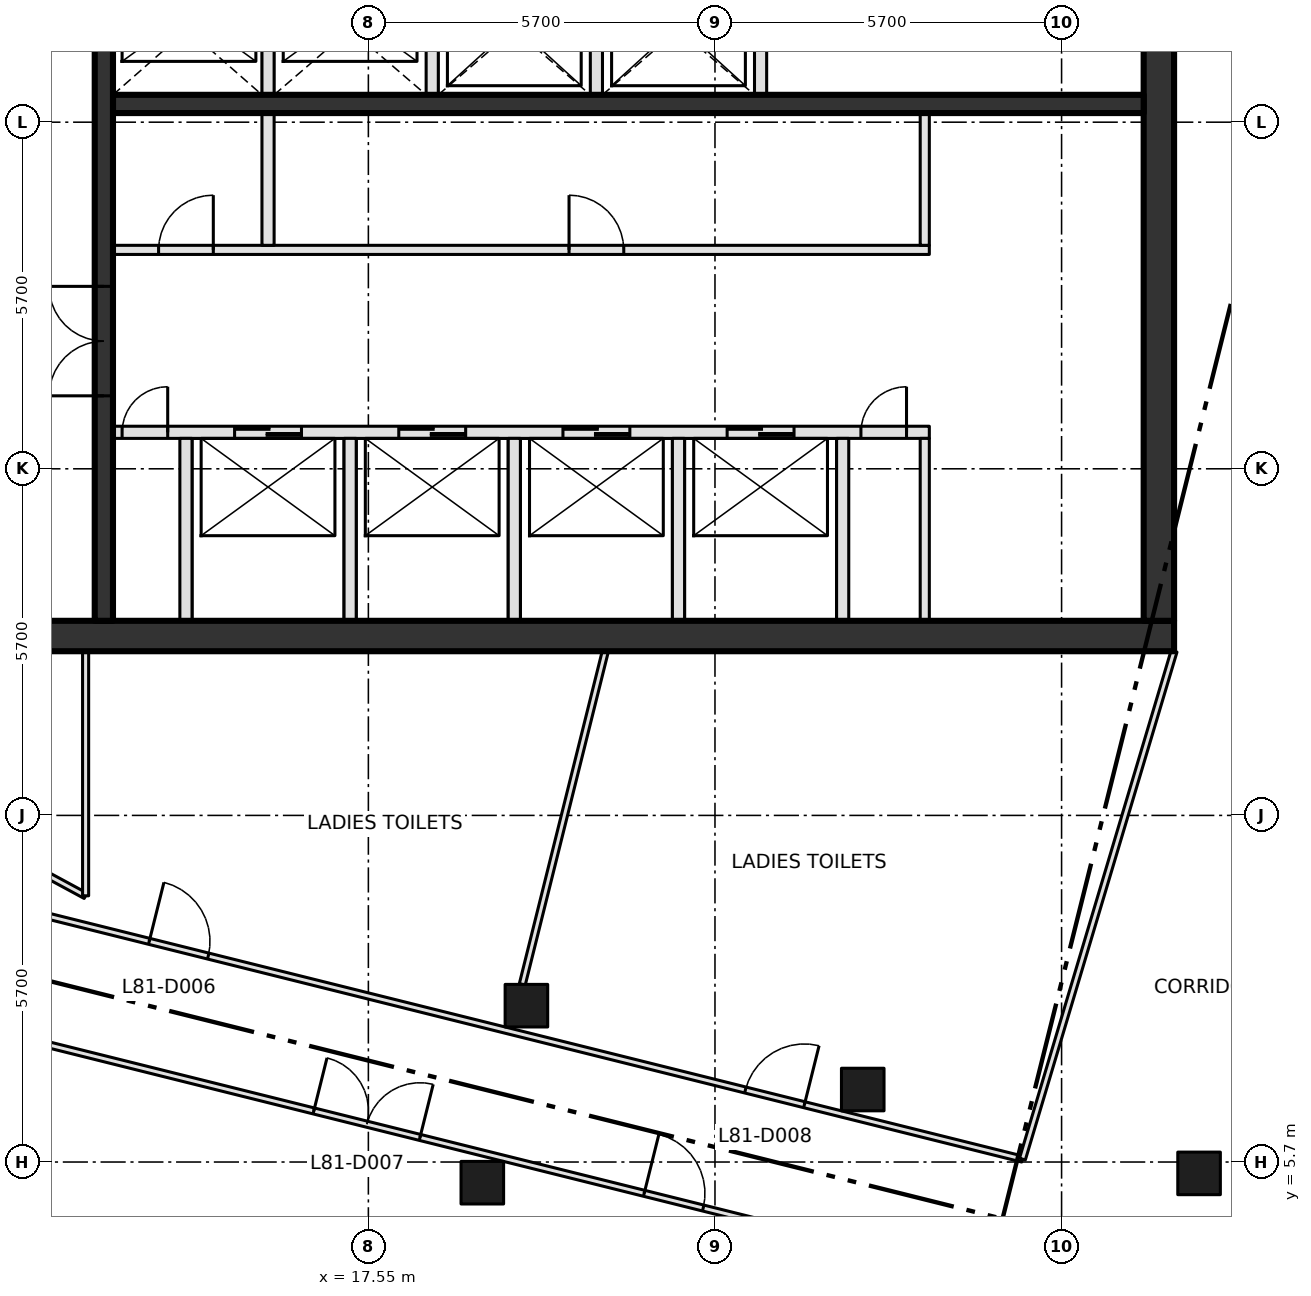
"""IFC4 building model, lengths in metres.
Left out: names, types, materials, properties, quantities, classifications, styles, units other than length and angle.
Written with IfcOpenShell. Run it as: python <this file> out.ifc"""

import sys

from ifc_helpers import new_model, si_unit, direction, frame, frame_2d, origin, origin_2d, place, context, subcontext, project, spatial, rectangle, extrude, element, fill, save


model = new_model("IFC4")
c1 = context("Model", 3, precision=1e-05, world=origin(), true_north=direction((0.0, 1.0)))
c2 = subcontext(c1, "Body", "Model", "MODEL_VIEW")
j1 = project(units=[si_unit("LENGTHUNIT", "METRE"), si_unit("PLANEANGLEUNIT", "RADIAN")], contexts=[c1])
p1 = place(None, origin())
s1 = spatial("IfcSite", under=j1, at=p1, CompositionType="ELEMENT")
p2 = place(p1, origin())
s2 = spatial("IfcBuilding", under=s1, at=p2, CompositionType="ELEMENT")
p3 = place(p2, frame((0.0, 0.0, 354.0)))
s3 = spatial("IfcBuildingStorey", under=s2, at=p3, CompositionType="ELEMENT", Elevation=354.0)
for number, where, z_axis, x_axis in (
    (1, (19.424, 5.36, 0.0), (0.0, 0.0, 1.0), (1.0, 0.0, 0.0)),
    (2, (20.149, 8.271, 0.0), (0.0, 0.0, 1.0), (1.0, 0.0, 0.0)),
    (3, (25.68, 6.892, 0.0), (0.0, 0.0, 1.0), (1.0, 0.0, 0.0)),
    (4, (31.211, 5.513, 0.0), (0.0, 0.0, 1.0), (1.0, 0.0, 0.0)),
):
    element("IfcColumn", number, at=place(p3, frame(where, z_axis=z_axis, x_axis=x_axis)), inside=s3, PredefinedType="COLUMN", context=c2, shape_type="SweptSolid", body=[
        extrude(rectangle(XDim=0.7, YDim=0.7, at=origin_2d()), origin(), (0.0, 0.0, 1.0), 4.2),
    ])
p4 = place(p3, frame((8.0, 14.35, -0.3), z_axis=(0.0, 0.0, 1.0), x_axis=(1.0, 0.0, 0.0)))
e5 = element("IfcWall", 5, at=p4, inside=s3, PredefinedType="SHEAR", context=c2, shape_type="SweptSolid", body=[
    extrude(rectangle(XDim=22.8, YDim=0.5, at=frame_2d((11.4, 0.0))), origin(), (0.0, 0.0, 1.0), 4.2),
])
p5 = place(p4, frame((2.3, 0.0, 0.3)))
e6 = element("IfcOpeningElement", 6, at=p5, cuts=e5, PredefinedType="OPENING", context=c2, shape_type="SweptSolid", body=[
    extrude(rectangle(XDim=1.8, YDim=2.1, at=frame_2d((0.9, 1.05))), frame((0.0, 0.26, 0.0), z_axis=(0.0, -1.0, 0.0), x_axis=(1.0, 0.0, 0.0)), (0.0, 0.0, 1.0), 0.52),
])
p6 = place(p3, frame((30.55, 14.6, -0.3), z_axis=(0.0, 0.0, 1.0), x_axis=(0.0, 1.0, 0.0)))
e7 = element("IfcWall", 7, at=p6, inside=s3, PredefinedType="SHEAR", context=c2, shape_type="SweptSolid", body=[
    extrude(rectangle(XDim=21.1, YDim=0.5, at=frame_2d((10.55, 0.0))), origin(), (0.0, 0.0, 1.0), 4.2),
])
p7 = place(p3, frame((13.35, 17.7, 0.0), z_axis=(0.0, 0.0, 1.0), x_axis=(1.0, 0.0, 0.0)))
e8 = element("IfcWall", 8, at=p7, inside=s3, PredefinedType="SOLIDWALL", context=c2, shape_type="SweptSolid", body=[
    extrude(rectangle(XDim=13.425, YDim=0.2, at=frame_2d((6.712, 0.0))), origin(), (0.0, 0.0, 1.0), 3.9),
])
p8 = place(p7, frame((2.0, 0.0, 0.0)))
e9 = element("IfcOpeningElement", 9, at=p8, cuts=e8, PredefinedType="OPENING", context=c2, shape_type="SweptSolid", body=[
    extrude(rectangle(XDim=1.1, YDim=2.1, at=frame_2d((0.55, 1.05))), frame((0.0, 0.11, 0.0), z_axis=(0.0, -1.0, 0.0), x_axis=(1.0, 0.0, 0.0)), (0.0, 0.0, 1.0), 0.22),
])
p9 = place(p7, frame((4.7, 0.0, 0.0)))
e10 = element("IfcOpeningElement", 10, at=p9, cuts=e8, PredefinedType="OPENING", context=c2, shape_type="SweptSolid", body=[
    extrude(rectangle(XDim=1.1, YDim=2.1, at=frame_2d((0.55, 1.05))), frame((0.0, 0.11, 0.0), z_axis=(0.0, -1.0, 0.0), x_axis=(1.0, 0.0, 0.0)), (0.0, 0.0, 1.0), 0.22),
])
p10 = place(p7, frame((7.4, 0.0, 0.0)))
e11 = element("IfcOpeningElement", 11, at=p10, cuts=e8, PredefinedType="OPENING", context=c2, shape_type="SweptSolid", body=[
    extrude(rectangle(XDim=1.1, YDim=2.1, at=frame_2d((0.55, 1.05))), frame((0.0, 0.11, 0.0), z_axis=(0.0, -1.0, 0.0), x_axis=(1.0, 0.0, 0.0)), (0.0, 0.0, 1.0), 0.22),
])
p11 = place(p7, frame((10.1, 0.0, 0.0)))
e12 = element("IfcOpeningElement", 12, at=p11, cuts=e8, PredefinedType="OPENING", context=c2, shape_type="SweptSolid", body=[
    extrude(rectangle(XDim=1.1, YDim=2.1, at=frame_2d((0.55, 1.05))), frame((0.0, 0.11, 0.0), z_axis=(0.0, -1.0, 0.0), x_axis=(1.0, 0.0, 0.0)), (0.0, 0.0, 1.0), 0.22),
])
p12 = place(p7, frame((0.15, 0.0, 0.0)))
e13 = element("IfcOpeningElement", 13, at=p12, cuts=e8, PredefinedType="OPENING", context=c2, shape_type="SweptSolid", body=[
    extrude(rectangle(XDim=0.75, YDim=2.1, at=frame_2d((0.375, 1.05))), frame((0.0, 0.11, 0.0), z_axis=(0.0, -1.0, 0.0), x_axis=(1.0, 0.0, 0.0)), (0.0, 0.0, 1.0), 0.22),
])
p13 = place(p7, frame((12.3, 0.0, 0.0)))
e14 = element("IfcOpeningElement", 14, at=p13, cuts=e8, PredefinedType="OPENING", context=c2, shape_type="SweptSolid", body=[
    extrude(rectangle(XDim=0.75, YDim=2.1, at=frame_2d((0.375, 1.05))), frame((0.0, 0.11, 0.0), z_axis=(0.0, -1.0, 0.0), x_axis=(1.0, 0.0, 0.0)), (0.0, 0.0, 1.0), 0.22),
])
p14 = place(p3, frame((13.35, 20.7, 0.0), z_axis=(0.0, 0.0, 1.0), x_axis=(1.0, 0.0, 0.0)))
e15 = element("IfcWall", 15, at=p14, inside=s3, PredefinedType="PARTITIONING", context=c2, shape_type="SweptSolid", body=[
    extrude(rectangle(XDim=13.425, YDim=0.15, at=frame_2d((6.712, 0.0))), origin(), (0.0, 0.0, 1.0), 3.9),
])
p15 = place(p14, frame((0.75, 0.0, 0.0)))
e16 = element("IfcOpeningElement", 16, at=p15, cuts=e15, PredefinedType="OPENING", context=c2, shape_type="SweptSolid", body=[
    extrude(rectangle(XDim=0.9, YDim=2.1, at=frame_2d((0.45, 1.05))), frame((0.0, 0.085, 0.0), z_axis=(0.0, -1.0, 0.0), x_axis=(1.0, 0.0, 0.0)), (0.0, 0.0, 1.0), 0.17),
])
p16 = place(p14, frame((7.5, 0.0, 0.0)))
e17 = element("IfcOpeningElement", 17, at=p16, cuts=e15, PredefinedType="OPENING", context=c2, shape_type="SweptSolid", body=[
    extrude(rectangle(XDim=0.9, YDim=2.1, at=frame_2d((0.45, 1.05))), frame((0.0, 0.085, 0.0), z_axis=(0.0, -1.0, 0.0), x_axis=(1.0, 0.0, 0.0)), (0.0, 0.0, 1.0), 0.17),
])
p17 = place(p3, frame((13.35, 23.1, 0.0), z_axis=(0.0, 0.0, 1.0), x_axis=(1.0, 0.0, 0.0)))
e18 = element("IfcWall", 18, at=p17, inside=s3, PredefinedType="SHEAR", context=c2, shape_type="SweptSolid", body=[
    extrude(rectangle(XDim=16.95, YDim=0.3, at=frame_2d((8.475, 0.0))), origin(), (0.0, 0.0, 1.0), 3.9),
])
p18 = place(p3, frame((13.2, 14.6, 0.0), z_axis=(0.0, 0.0, 1.0), x_axis=(0.0, 1.0, 0.0)))
e19 = element("IfcWall", 19, at=p18, inside=s3, PredefinedType="SHEAR", context=c2, shape_type="SweptSolid", body=[
    extrude(rectangle(XDim=21.1, YDim=0.3, at=frame_2d((10.55, 0.0))), origin(), (0.0, 0.0, 1.0), 3.9),
])
p19 = place(p18, frame((3.7, 0.0, 0.0)))
e20 = element("IfcOpeningElement", 20, at=p19, cuts=e19, PredefinedType="OPENING", context=c2, shape_type="SweptSolid", body=[
    extrude(rectangle(XDim=1.8, YDim=2.1, at=frame_2d((0.9, 1.05))), frame((0.0, 0.16, 0.0), z_axis=(0.0, -1.0, 0.0), x_axis=(1.0, 0.0, 0.0)), (0.0, 0.0, 1.0), 0.32),
])
p20 = place(p18, frame((11.8, 0.0, 0.0)))
e21 = element("IfcOpeningElement", 21, at=p20, cuts=e19, PredefinedType="OPENING", context=c2, shape_type="SweptSolid", body=[
    extrude(rectangle(XDim=1.2, YDim=2.1, at=frame_2d((0.6, 1.05))), frame((0.0, 0.16, 0.0), z_axis=(0.0, -1.0, 0.0), x_axis=(1.0, 0.0, 0.0)), (0.0, 0.0, 1.0), 0.32),
])
p21 = place(p3, frame((14.55, 14.6, 0.0), z_axis=(0.0, 0.0, 1.0), x_axis=(0.0, 1.0, 0.0)))
e22 = element("IfcWall", 22, at=p21, inside=s3, PredefinedType="SOLIDWALL", context=c2, shape_type="SweptSolid", body=[
    extrude(rectangle(XDim=3.0, YDim=0.2, at=frame_2d((1.5, 0.0))), origin(), (0.0, 0.0, 1.0), 3.9),
])
p22 = place(p3, frame((15.9, 20.775, 0.0), z_axis=(0.0, 0.0, 1.0), x_axis=(0.0, 1.0, 0.0)))
e23 = element("IfcWall", 23, at=p22, inside=s3, PredefinedType="SOLIDWALL", context=c2, shape_type="SweptSolid", body=[
    extrude(rectangle(XDim=4.625, YDim=0.2, at=frame_2d((2.312, 0.0))), origin(), (0.0, 0.0, 1.0), 3.9),
])
p23 = place(p3, frame((17.25, 14.6, 0.0), z_axis=(0.0, 0.0, 1.0), x_axis=(0.0, 1.0, 0.0)))
e24 = element("IfcWall", 24, at=p23, inside=s3, PredefinedType="SOLIDWALL", context=c2, shape_type="SweptSolid", body=[
    extrude(rectangle(XDim=3.0, YDim=0.2, at=frame_2d((1.5, 0.0))), origin(), (0.0, 0.0, 1.0), 3.9),
])
p24 = place(p3, frame((18.6, 23.25, 0.0), z_axis=(0.0, 0.0, 1.0), x_axis=(0.0, 1.0, 0.0)))
e25 = element("IfcWall", 25, at=p24, inside=s3, PredefinedType="SOLIDWALL", context=c2, shape_type="SweptSolid", body=[
    extrude(rectangle(XDim=5.15, YDim=0.2, at=frame_2d((2.575, 0.0))), origin(), (0.0, 0.0, 1.0), 3.9),
])
p25 = place(p24, frame((3.15, 0.0, 0.0)))
e26 = element("IfcOpeningElement", 26, at=p25, cuts=e25, PredefinedType="OPENING", context=c2, shape_type="SweptSolid", body=[
    extrude(rectangle(XDim=1.2, YDim=2.1, at=frame_2d((0.6, 1.05))), frame((0.0, 0.11, 0.0), z_axis=(0.0, -1.0, 0.0), x_axis=(1.0, 0.0, 0.0)), (0.0, 0.0, 1.0), 0.22),
])
p26 = place(p3, frame((19.95, 14.6, 0.0), z_axis=(0.0, 0.0, 1.0), x_axis=(0.0, 1.0, 0.0)))
e27 = element("IfcWall", 27, at=p26, inside=s3, PredefinedType="SOLIDWALL", context=c2, shape_type="SweptSolid", body=[
    extrude(rectangle(XDim=3.0, YDim=0.2, at=frame_2d((1.5, 0.0))), origin(), (0.0, 0.0, 1.0), 3.9),
])
p27 = place(p3, frame((21.3, 23.25, 0.0), z_axis=(0.0, 0.0, 1.0), x_axis=(0.0, 1.0, 0.0)))
e28 = element("IfcWall", 28, at=p27, inside=s3, PredefinedType="SOLIDWALL", context=c2, shape_type="SweptSolid", body=[
    extrude(rectangle(XDim=2.15, YDim=0.2, at=frame_2d((1.075, 0.0))), origin(), (0.0, 0.0, 1.0), 3.9),
])
p28 = place(p3, frame((22.65, 14.6, 0.0), z_axis=(0.0, 0.0, 1.0), x_axis=(0.0, 1.0, 0.0)))
e29 = element("IfcWall", 29, at=p28, inside=s3, PredefinedType="SOLIDWALL", context=c2, shape_type="SweptSolid", body=[
    extrude(rectangle(XDim=3.0, YDim=0.2, at=frame_2d((1.5, 0.0))), origin(), (0.0, 0.0, 1.0), 3.9),
])
p29 = place(p3, frame((24.0, 23.25, 0.0), z_axis=(0.0, 0.0, 1.0), x_axis=(0.0, 1.0, 0.0)))
e30 = element("IfcWall", 30, at=p29, inside=s3, PredefinedType="SOLIDWALL", context=c2, shape_type="SweptSolid", body=[
    extrude(rectangle(XDim=2.15, YDim=0.2, at=frame_2d((1.075, 0.0))), origin(), (0.0, 0.0, 1.0), 3.9),
])
p30 = place(p3, frame((25.35, 14.6, 0.0), z_axis=(0.0, 0.0, 1.0), x_axis=(0.0, 1.0, 0.0)))
e31 = element("IfcWall", 31, at=p30, inside=s3, PredefinedType="SOLIDWALL", context=c2, shape_type="SweptSolid", body=[
    extrude(rectangle(XDim=3.0, YDim=0.2, at=frame_2d((1.5, 0.0))), origin(), (0.0, 0.0, 1.0), 3.9),
])
p31 = place(p3, frame((26.7, 14.6, 0.0), z_axis=(0.0, 0.0, 1.0), x_axis=(0.0, 1.0, 0.0)))
e32 = element("IfcWall", 32, at=p31, inside=s3, PredefinedType="PARTITIONING", context=c2, shape_type="SweptSolid", body=[
    extrude(rectangle(XDim=3.0, YDim=0.15, at=frame_2d((1.5, 0.0))), origin(), (0.0, 0.0, 1.0), 3.9),
])
p32 = place(p3, frame((26.7, 20.775, 0.0), z_axis=(0.0, 0.0, 1.0), x_axis=(0.0, 1.0, 0.0)))
e33 = element("IfcWall", 33, at=p32, inside=s3, PredefinedType="PARTITIONING", context=c2, shape_type="SweptSolid", body=[
    extrude(rectangle(XDim=2.175, YDim=0.15, at=frame_2d((1.087, 0.0))), origin(), (0.0, 0.0, 1.0), 3.9),
])
p33 = place(p3, frame((8.521, 8.567, 0.0), z_axis=(0.0, 0.0, 1.0), x_axis=(0.970303035129, -0.241892579506, 0.0)))
e34 = element("IfcWall", 34, at=p33, inside=s3, PredefinedType="PARTITIONING", context=c2, shape_type="SweptSolid", body=[
    extrude(rectangle(XDim=28.5, YDim=0.1, at=frame_2d((14.25, 0.0))), origin(), (0.0, 0.0, 1.0), 3.9),
])
p34 = place(p33, frame((13.98, 0.0, 0.0)))
e35 = element("IfcOpeningElement", 35, at=p34, cuts=e34, PredefinedType="OPENING", context=c2, shape_type="SweptSolid", body=[
    extrude(rectangle(XDim=1.0, YDim=2.1, at=frame_2d((0.5, 1.05))), frame((0.0, 0.06, 0.0), z_axis=(0.0, -1.0, 0.0), x_axis=(1.0, 0.0, 0.0)), (0.0, 0.0, 1.0), 0.12),
])
p35 = place(p33, frame((8.38, 0.0, 0.0)))
e36 = element("IfcOpeningElement", 36, at=p35, cuts=e34, PredefinedType="OPENING", context=c2, shape_type="SweptSolid", body=[
    extrude(rectangle(XDim=1.8, YDim=2.1, at=frame_2d((0.9, 1.05))), frame((0.0, 0.06, 0.0), z_axis=(0.0, -1.0, 0.0), x_axis=(1.0, 0.0, 0.0)), (0.0, 0.0, 1.0), 0.12),
])
p36 = place(p3, frame((9.017, 10.558, 0.0), z_axis=(0.0, 0.0, 1.0), x_axis=(0.970286089829, -0.241960542, 0.0)))
e37 = element("IfcWall", 37, at=p36, inside=s3, PredefinedType="PARTITIONING", context=c2, shape_type="SweptSolid", body=[
    extrude(rectangle(XDim=19.879, YDim=0.1, at=frame_2d((9.94, 0.0))), origin(), (0.0, 0.0, 1.0), 3.9),
])
p37 = place(p36, frame((5.08, 0.0, 0.0)))
e38 = element("IfcOpeningElement", 38, at=p37, cuts=e37, PredefinedType="OPENING", context=c2, shape_type="SweptSolid", body=[
    extrude(rectangle(XDim=1.0, YDim=2.1, at=frame_2d((0.5, 1.05))), frame((0.0, 0.06, 0.0), z_axis=(0.0, -1.0, 0.0), x_axis=(1.0, 0.0, 0.0)), (0.0, 0.0, 1.0), 0.12),
])
p38 = place(p36, frame((15.184, 0.0, 0.0)))
e39 = element("IfcOpeningElement", 39, at=p38, cuts=e37, PredefinedType="OPENING", context=c2, shape_type="SweptSolid", body=[
    extrude(rectangle(XDim=1.0, YDim=2.1, at=frame_2d((0.5, 1.05))), frame((0.0, 0.06, 0.0), z_axis=(0.0, -1.0, 0.0), x_axis=(1.0, 0.0, 0.0)), (0.0, 0.0, 1.0), 0.12),
])
p39 = place(p3, frame((9.9, 11.7, 0.0), z_axis=(0.0, 0.0, 1.0), x_axis=(0.87965147249, -0.475618846291, 0.0)))
e40 = element("IfcWall", 40, at=p39, inside=s3, PredefinedType="PARTITIONING", context=c2, shape_type="SweptSolid", body=[
    extrude(rectangle(XDim=3.41, YDim=0.1, at=frame_2d((1.705, 0.0))), origin(), (0.0, 0.0, 1.0), 3.9),
])
p40 = place(p3, frame((12.9, 10.078, 0.0), z_axis=(0.0, 0.0, 1.0), x_axis=(0.0, 1.0, 0.0)))
e41 = element("IfcWall", 41, at=p40, inside=s3, PredefinedType="PARTITIONING", context=c2, shape_type="SweptSolid", body=[
    extrude(rectangle(XDim=4.022, YDim=0.1, at=frame_2d((2.011, 0.0))), origin(), (0.0, 0.0, 1.0), 3.9),
])
p41 = place(p3, frame((30.8, 14.1, 0.0), z_axis=(0.0, 0.0, 1.0), x_axis=(-0.286139929679, -0.958187842045, 0.0)))
e42 = element("IfcWall", 42, at=p41, inside=s3, PredefinedType="PARTITIONING", context=c2, shape_type="SweptSolid", body=[
    extrude(rectangle(XDim=8.717, YDim=0.1, at=frame_2d((4.358, 0.0))), origin(), (0.0, 0.0, 1.0), 3.9),
])
p42 = place(p3, frame((20.081, 8.621, 0.0), z_axis=(0.0, 0.0, 1.0), x_axis=(0.241904838353, 0.970299978966, 0.0)))
e43 = element("IfcWall", 43, at=p42, inside=s3, PredefinedType="PARTITIONING", context=c2, shape_type="SweptSolid", body=[
    extrude(rectangle(XDim=5.647, YDim=0.1, at=frame_2d((2.823, 0.0))), origin(), (0.0, 0.0, 1.0), 3.9),
])
p43 = place(p8, origin())
e44 = element("IfcDoor", 44, at=p43, inside=s3, OperationType="SLIDING_TO_LEFT", PredefinedType="DOOR", context=c2, shape_type="SweptSolid", body=[
    extrude(rectangle(XDim=1.1, YDim=2.1, at=frame_2d((0.55, 1.05))), frame((0.0, 0.025, 0.0), z_axis=(0.0, -1.0, 0.0), x_axis=(1.0, 0.0, 0.0)), (0.0, 0.0, 1.0), 0.05),
])
fill(e9, e44)
p44 = place(p9, origin())
e45 = element("IfcDoor", 45, at=p44, inside=s3, OperationType="SLIDING_TO_LEFT", PredefinedType="DOOR", context=c2, shape_type="SweptSolid", body=[
    extrude(rectangle(XDim=1.1, YDim=2.1, at=frame_2d((0.55, 1.05))), frame((0.0, 0.025, 0.0), z_axis=(0.0, -1.0, 0.0), x_axis=(1.0, 0.0, 0.0)), (0.0, 0.0, 1.0), 0.05),
])
fill(e10, e45)
p45 = place(p10, origin())
e46 = element("IfcDoor", 46, at=p45, inside=s3, OperationType="SLIDING_TO_LEFT", PredefinedType="DOOR", context=c2, shape_type="SweptSolid", body=[
    extrude(rectangle(XDim=1.1, YDim=2.1, at=frame_2d((0.55, 1.05))), frame((0.0, 0.025, 0.0), z_axis=(0.0, -1.0, 0.0), x_axis=(1.0, 0.0, 0.0)), (0.0, 0.0, 1.0), 0.05),
])
fill(e11, e46)
p46 = place(p11, origin())
e47 = element("IfcDoor", 47, at=p46, inside=s3, OperationType="SLIDING_TO_LEFT", PredefinedType="DOOR", context=c2, shape_type="SweptSolid", body=[
    extrude(rectangle(XDim=1.1, YDim=2.1, at=frame_2d((0.55, 1.05))), frame((0.0, 0.025, 0.0), z_axis=(0.0, -1.0, 0.0), x_axis=(1.0, 0.0, 0.0)), (0.0, 0.0, 1.0), 0.05),
])
fill(e12, e47)
p47 = place(p12, origin())
e48 = element("IfcDoor", 48, at=p47, inside=s3, OperationType="SINGLE_SWING_RIGHT", PredefinedType="DOOR", context=c2, shape_type="SweptSolid", body=[
    extrude(rectangle(XDim=0.75, YDim=2.1, at=frame_2d((0.375, 1.05))), frame((0.0, 0.025, 0.0), z_axis=(0.0, -1.0, 0.0), x_axis=(1.0, 0.0, 0.0)), (0.0, 0.0, 1.0), 0.05),
])
fill(e13, e48)
p48 = place(p13, origin())
e49 = element("IfcDoor", 49, at=p48, inside=s3, OperationType="SINGLE_SWING_RIGHT", PredefinedType="DOOR", context=c2, shape_type="SweptSolid", body=[
    extrude(rectangle(XDim=0.75, YDim=2.1, at=frame_2d((0.375, 1.05))), frame((0.0, 0.025, 0.0), z_axis=(0.0, -1.0, 0.0), x_axis=(1.0, 0.0, 0.0)), (0.0, 0.0, 1.0), 0.05),
])
fill(e14, e49)
p49 = place(p15, origin())
e50 = element("IfcDoor", 50, at=p49, inside=s3, OperationType="SINGLE_SWING_RIGHT", PredefinedType="DOOR", context=c2, shape_type="SweptSolid", body=[
    extrude(rectangle(XDim=0.9, YDim=2.1, at=frame_2d((0.45, 1.05))), frame((0.0, 0.025, 0.0), z_axis=(0.0, -1.0, 0.0), x_axis=(1.0, 0.0, 0.0)), (0.0, 0.0, 1.0), 0.05),
])
fill(e16, e50)
p50 = place(p16, origin())
e51 = element("IfcDoor", 51, at=p50, inside=s3, OperationType="SINGLE_SWING_LEFT", PredefinedType="DOOR", context=c2, shape_type="SweptSolid", body=[
    extrude(rectangle(XDim=0.9, YDim=2.1, at=frame_2d((0.45, 1.05))), frame((0.0, 0.025, 0.0), z_axis=(0.0, -1.0, 0.0), x_axis=(1.0, 0.0, 0.0)), (0.0, 0.0, 1.0), 0.05),
])
fill(e17, e51)
p51 = place(p19, origin())
e52 = element("IfcDoor", 52, at=p51, inside=s3, OperationType="DOUBLE_DOOR_SINGLE_SWING", PredefinedType="DOOR", context=c2, shape_type="SweptSolid", body=[
    extrude(rectangle(XDim=1.8, YDim=2.1, at=frame_2d((0.9, 1.05))), frame((0.0, 0.025, 0.0), z_axis=(0.0, -1.0, 0.0), x_axis=(1.0, 0.0, 0.0)), (0.0, 0.0, 1.0), 0.05),
])
fill(e20, e52)
p52 = place(p34, origin())
e53 = element("IfcDoor", 53, at=p52, inside=s3, OperationType="SINGLE_SWING_LEFT", PredefinedType="DOOR", context=c2, shape_type="SweptSolid", body=[
    extrude(rectangle(XDim=1.0, YDim=2.1, at=frame_2d((0.5, 1.05))), frame((0.0, 0.025, 0.0), z_axis=(0.0, -1.0, 0.0), x_axis=(1.0, 0.0, 0.0)), (0.0, 0.0, 1.0), 0.05),
])
fill(e35, e53)
p53 = place(p37, origin())
e54 = element("IfcDoor", 54, at=p53, inside=s3, OperationType="SINGLE_SWING_LEFT", PredefinedType="DOOR", context=c2, shape_type="SweptSolid", body=[
    extrude(rectangle(XDim=1.0, YDim=2.1, at=frame_2d((0.5, 1.05))), frame((0.0, 0.025, 0.0), z_axis=(0.0, -1.0, 0.0), x_axis=(1.0, 0.0, 0.0)), (0.0, 0.0, 1.0), 0.05),
])
fill(e38, e54)
p54 = place(p35, origin())
e55 = element("IfcDoor", 55, at=p54, inside=s3, OperationType="DOUBLE_DOOR_SINGLE_SWING", PredefinedType="DOOR", context=c2, shape_type="SweptSolid", body=[
    extrude(rectangle(XDim=1.8, YDim=2.1, at=frame_2d((0.9, 1.05))), frame((0.0, 0.025, 0.0), z_axis=(0.0, -1.0, 0.0), x_axis=(1.0, 0.0, 0.0)), (0.0, 0.0, 1.0), 0.05),
])
fill(e36, e55)
p55 = place(p38, origin())
e56 = element("IfcDoor", 56, at=p55, inside=s3, OperationType="SINGLE_SWING_RIGHT", PredefinedType="DOOR", context=c2, shape_type="SweptSolid", body=[
    extrude(rectangle(XDim=1.0, YDim=2.1, at=frame_2d((0.5, 1.05))), frame((0.0, 0.025, 0.0), z_axis=(0.0, -1.0, 0.0), x_axis=(1.0, 0.0, 0.0)), (0.0, 0.0, 1.0), 0.05),
])
fill(e39, e56)
save(model, sys.argv[1])
